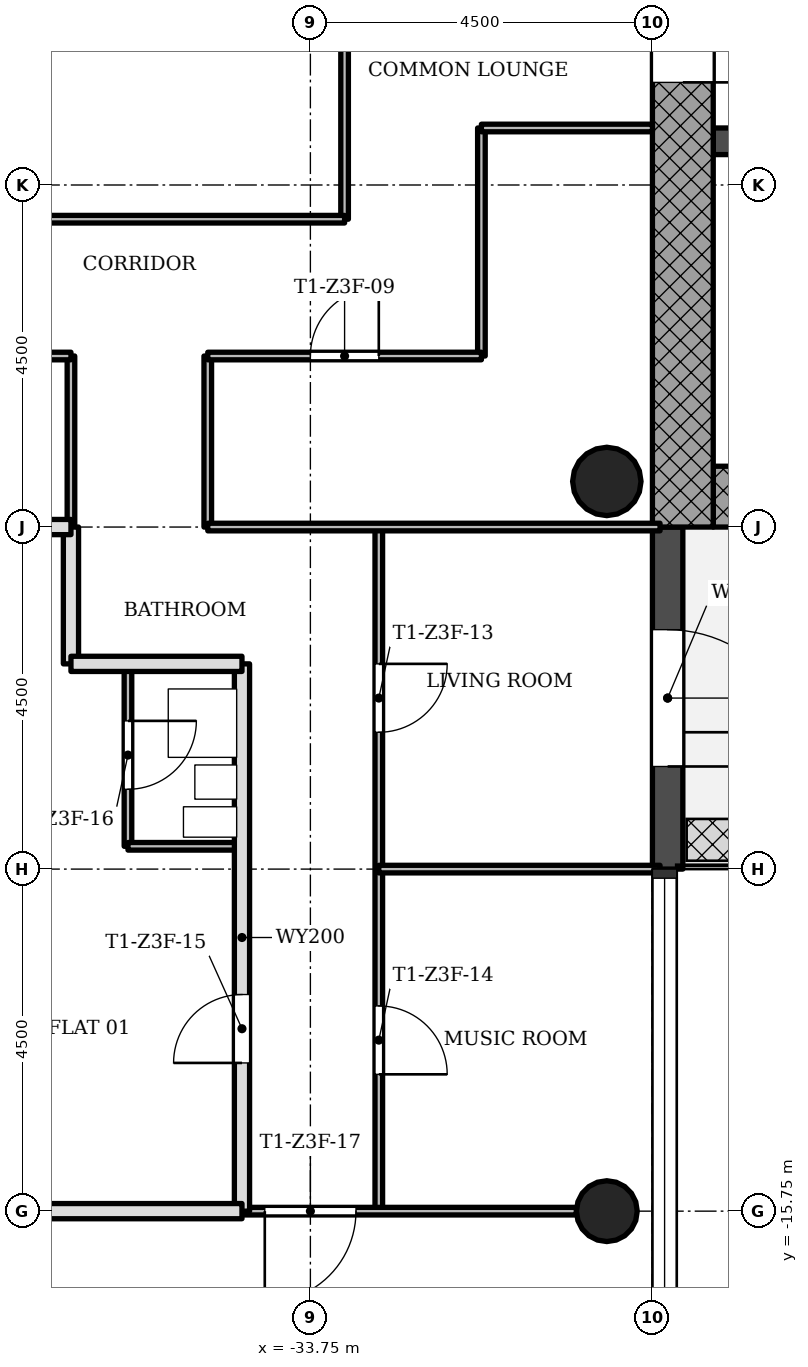
"""IFC4 building model, lengths in metres.
Left out: names, types, materials, properties, quantities, classifications, styles, units other than length and angle.
Written with IfcOpenShell. Run it as: python <this file> out.ifc"""

import sys

from ifc_helpers import new_model, si_unit, direction, frame, frame_2d, origin, origin_2d, place, context, subcontext, project, spatial, rectangle, hollow_circle, extrude, element, fill, save


model = new_model("IFC4")
c1 = context("Model", 3, precision=1e-05, world=origin(), true_north=direction((0.0, 1.0)))
c2 = subcontext(c1, "Body", "Model", "MODEL_VIEW")
j1 = project(units=[si_unit("LENGTHUNIT", "METRE"), si_unit("PLANEANGLEUNIT", "RADIAN")], contexts=[c1])
p1 = place(None, origin())
s1 = spatial("IfcSite", under=j1, at=p1, CompositionType="ELEMENT")
p2 = place(p1, origin())
s2 = spatial("IfcBuilding", under=s1, at=p2, CompositionType="ELEMENT")
p3 = place(p2, frame((0.0, 0.0, 167.7)))
s3 = spatial("IfcBuildingStorey", under=s2, at=p3, CompositionType="ELEMENT", Elevation=167.7)
p4 = place(p3, frame((-28.45, -6.35, 0.0), z_axis=(0.0, 0.0, 1.0), x_axis=(1.0, 0.0, 0.0)))
e1 = element("IfcWall", 1, at=p4, inside=s3, PredefinedType="SHEAR", context=c2, shape_type="SweptSolid", body=[
    extrude(rectangle(XDim=8.2, YDim=0.8, at=frame_2d((4.1, 0.0))), origin(), (0.0, 0.0, 1.0), 3.4),
])
p5 = place(p3, frame((-28.85, 5.95, 0.0), z_axis=(0.0, 0.0, 1.0), x_axis=(0.0, -1.0, 0.0)))
e2 = element("IfcWall", 2, at=p5, inside=s3, PredefinedType="SHEAR", context=c2, shape_type="SweptSolid", body=[
    extrude(rectangle(XDim=12.7, YDim=0.8, at=frame_2d((6.35, 0.0))), origin(), (0.0, 0.0, 1.0), 3.4),
])
p6 = place(p5, frame((5.05, 0.0, 0.0)))
e3 = element("IfcOpeningElement", 3, at=p6, cuts=e2, PredefinedType="OPENING", context=c2, shape_type="SweptSolid", body=[
    extrude(rectangle(XDim=1.8, YDim=2.1, at=frame_2d((0.9, 1.05))), frame((0.0, 0.41, 0.0), z_axis=(0.0, -1.0, 0.0), x_axis=(1.0, 0.0, 0.0)), (0.0, 0.0, 1.0), 0.82),
])
p7 = place(p3, frame((-28.45, -1.675, 0.0), z_axis=(0.0, 0.0, 1.0), x_axis=(1.0, 0.0, 0.0)))
e4 = element("IfcWall", 4, at=p7, inside=s3, PredefinedType="SHEAR", context=c2, shape_type="SweptSolid", body=[
    extrude(rectangle(XDim=7.4, YDim=0.35, at=frame_2d((3.7, 0.0))), origin(), (0.0, 0.0, 1.0), 3.4),
])
p8 = place(p7, frame((0.95, 0.0, 0.0)))
e5 = element("IfcOpeningElement", 5, at=p8, cuts=e4, PredefinedType="OPENING", context=c2, shape_type="SweptSolid", body=[
    extrude(rectangle(XDim=1.1, YDim=2.1, at=frame_2d((0.55, 1.05))), frame((0.0, 0.185, 0.0), z_axis=(0.0, -1.0, 0.0), x_axis=(1.0, 0.0, 0.0)), (0.0, 0.0, 1.0), 0.37),
])
p9 = place(p7, frame((3.15, 0.0, 0.0)))
e6 = element("IfcOpeningElement", 6, at=p9, cuts=e4, PredefinedType="OPENING", context=c2, shape_type="SweptSolid", body=[
    extrude(rectangle(XDim=1.1, YDim=2.1, at=frame_2d((0.55, 1.05))), frame((0.0, 0.185, 0.0), z_axis=(0.0, -1.0, 0.0), x_axis=(1.0, 0.0, 0.0)), (0.0, 0.0, 1.0), 0.37),
])
p10 = place(p7, frame((5.35, 0.0, 0.0)))
e7 = element("IfcOpeningElement", 7, at=p10, cuts=e4, PredefinedType="OPENING", context=c2, shape_type="SweptSolid", body=[
    extrude(rectangle(XDim=1.1, YDim=2.1, at=frame_2d((0.55, 1.05))), frame((0.0, 0.185, 0.0), z_axis=(0.0, -1.0, 0.0), x_axis=(1.0, 0.0, 0.0)), (0.0, 0.0, 1.0), 0.37),
])
p11 = place(p3, frame((-29.85, -15.75, 0.0), z_axis=(0.0, 0.0, 1.0), x_axis=(1.0, 0.0, 0.0)))
e8 = element("IfcColumn", 8, at=p11, inside=s3, PredefinedType="COLUMN", context=c2, shape_type="SweptSolid", body=[
    extrude(hollow_circle(Radius=0.4, WallThickness=0.028, at=origin_2d()), origin(), (0.0, 0.0, 1.0), 3.4),
])
p12 = place(p3, frame((-29.85, -6.15, 0.0), z_axis=(0.0, 0.0, 1.0), x_axis=(1.0, 0.0, 0.0)))
e9 = element("IfcColumn", 9, at=p12, inside=s3, PredefinedType="COLUMN", context=c2, shape_type="SweptSolid", body=[
    extrude(hollow_circle(Radius=0.45, WallThickness=0.032, at=origin_2d()), origin(), (0.0, 0.0, 1.0), 3.4),
])
p13 = place(p3, frame((-29.05, -11.25, -0.02), z_axis=(0.0, 0.0, 1.0), x_axis=(0.0, 1.0, 0.0)))
e10 = element("IfcWall", 10, at=p13, inside=s3, PredefinedType="STANDARD", context=c2, shape_type="SweptSolid", body=[
    extrude(rectangle(XDim=4.5, YDim=0.4, at=frame_2d((2.25, 0.0))), origin(), (0.0, 0.0, 1.0), 3.12),
])
p14 = place(p13, frame((1.35, 0.0, 0.02)))
e11 = element("IfcOpeningElement", 11, at=p14, cuts=e10, PredefinedType="OPENING", context=c2, shape_type="SweptSolid", body=[
    extrude(rectangle(XDim=1.8, YDim=2.1, at=frame_2d((0.9, 1.05))), frame((0.0, 0.21, 0.0), z_axis=(0.0, -1.0, 0.0), x_axis=(1.0, 0.0, 0.0)), (0.0, 0.0, 1.0), 0.42),
])
p15 = place(p3, frame((-36.9, -6.75, 0.0), z_axis=(0.0, 0.0, 1.0), x_axis=(0.0, 1.0, 0.0)))
e12 = element("IfcWall", 12, at=p15, inside=s3, PredefinedType="PARTITIONING", context=c2, shape_type="SweptSolid", body=[
    extrude(rectangle(XDim=2.25, YDim=0.1, at=frame_2d((1.125, 0.0))), origin(), (0.0, 0.0, 1.0), 3.0),
])
p16 = place(p3, frame((-36.9, -8.55, 0.0), z_axis=(0.0, 0.0, 1.0), x_axis=(0.0, 1.0, 0.0)))
e13 = element("IfcWall", 13, at=p16, inside=s3, PredefinedType="SOLIDWALL", context=c2, shape_type="SweptSolid", body=[
    extrude(rectangle(XDim=1.8, YDim=0.2, at=frame_2d((0.9, 0.0))), origin(), (0.0, 0.0, 1.0), 3.0),
])
p17 = place(p3, frame((-36.15, -10.95, 0.0), z_axis=(0.0, 0.0, 1.0), x_axis=(0.0, 1.0, 0.0)))
e14 = element("IfcWall", 14, at=p17, inside=s3, PredefinedType="PARTITIONING", context=c2, shape_type="SweptSolid", body=[
    extrude(rectangle(XDim=2.4, YDim=0.1, at=frame_2d((1.2, 0.0))), origin(), (0.0, 0.0, 1.0), 3.0),
])
p18 = place(p17, frame((0.75, 0.0, 0.0)))
e15 = element("IfcOpeningElement", 15, at=p18, cuts=e14, PredefinedType="OPENING", context=c2, shape_type="SweptSolid", body=[
    extrude(rectangle(XDim=0.9, YDim=2.1, at=frame_2d((0.45, 1.05))), frame((0.0, 0.06, 0.0), z_axis=(0.0, -1.0, 0.0), x_axis=(1.0, 0.0, 0.0)), (0.0, 0.0, 1.0), 0.12),
])
p19 = place(p3, frame((-35.1, -6.75, 0.0), z_axis=(0.0, 0.0, 1.0), x_axis=(0.0, 1.0, 0.0)))
e16 = element("IfcWall", 16, at=p19, inside=s3, PredefinedType="PARTITIONING", context=c2, shape_type="SweptSolid", body=[
    extrude(rectangle(XDim=2.25, YDim=0.1, at=frame_2d((1.125, 0.0))), origin(), (0.0, 0.0, 1.0), 3.0),
])
p20 = place(p3, frame((-34.65, -15.75, 0.0), z_axis=(0.0, 0.0, 1.0), x_axis=(0.0, 1.0, 0.0)))
e17 = element("IfcWall", 17, at=p20, inside=s3, PredefinedType="SOLIDWALL", context=c2, shape_type="SweptSolid", body=[
    extrude(rectangle(XDim=7.2, YDim=0.2, at=frame_2d((3.6, 0.0))), origin(), (0.0, 0.0, 1.0), 3.0),
])
p21 = place(p20, frame((1.95, 0.0, 0.0)))
e18 = element("IfcOpeningElement", 18, at=p21, cuts=e17, PredefinedType="OPENING", context=c2, shape_type="SweptSolid", body=[
    extrude(rectangle(XDim=0.9, YDim=2.1, at=frame_2d((0.45, 1.05))), frame((0.0, 0.11, 0.0), z_axis=(0.0, -1.0, 0.0), x_axis=(1.0, 0.0, 0.0)), (0.0, 0.0, 1.0), 0.22),
])
p22 = place(p3, frame((-33.3, -2.7, 0.0), z_axis=(0.0, 0.0, 1.0), x_axis=(0.0, 1.0, 0.0)))
e19 = element("IfcWall", 19, at=p22, inside=s3, PredefinedType="PARTITIONING", context=c2, shape_type="SweptSolid", body=[
    extrude(rectangle(XDim=5.4, YDim=0.1, at=frame_2d((2.7, 0.0))), origin(), (0.0, 0.0, 1.0), 3.0),
])
p23 = place(p22, frame((2.25, 0.0, 0.0)))
e20 = element("IfcOpeningElement", 20, at=p23, cuts=e19, PredefinedType="OPENING", context=c2, shape_type="SweptSolid", body=[
    extrude(rectangle(XDim=0.9, YDim=2.1, at=frame_2d((0.45, 1.05))), frame((0.0, 0.06, 0.0), z_axis=(0.0, -1.0, 0.0), x_axis=(1.0, 0.0, 0.0)), (0.0, 0.0, 1.0), 0.12),
])
p24 = place(p3, frame((-32.85, -15.75, 0.0), z_axis=(0.0, 0.0, 1.0), x_axis=(0.0, 1.0, 0.0)))
e21 = element("IfcWall", 21, at=p24, inside=s3, PredefinedType="PARTITIONING", context=c2, shape_type="SweptSolid", body=[
    extrude(rectangle(XDim=9.0, YDim=0.1, at=frame_2d((4.5, 0.0))), origin(), (0.0, 0.0, 1.0), 3.0),
])
p25 = place(p24, frame((6.3, 0.0, 0.0)))
e22 = element("IfcOpeningElement", 22, at=p25, cuts=e21, PredefinedType="OPENING", context=c2, shape_type="SweptSolid", body=[
    extrude(rectangle(XDim=0.9, YDim=2.1, at=frame_2d((0.45, 1.05))), frame((0.0, 0.06, 0.0), z_axis=(0.0, -1.0, 0.0), x_axis=(1.0, 0.0, 0.0)), (0.0, 0.0, 1.0), 0.12),
])
p26 = place(p24, frame((1.8, 0.0, 0.0)))
e23 = element("IfcOpeningElement", 23, at=p26, cuts=e21, PredefinedType="OPENING", context=c2, shape_type="SweptSolid", body=[
    extrude(rectangle(XDim=0.9, YDim=2.1, at=frame_2d((0.45, 1.05))), frame((0.0, 0.06, 0.0), z_axis=(0.0, -1.0, 0.0), x_axis=(1.0, 0.0, 0.0)), (0.0, 0.0, 1.0), 0.12),
])
p27 = place(p3, frame((-31.5, -4.5, 0.0), z_axis=(0.0, 0.0, 1.0), x_axis=(0.0, 1.0, 0.0)))
e24 = element("IfcWall", 24, at=p27, inside=s3, PredefinedType="PARTITIONING", context=c2, shape_type="SweptSolid", body=[
    extrude(rectangle(XDim=3.0, YDim=0.1, at=frame_2d((1.5, 0.0))), origin(), (0.0, 0.0, 1.0), 3.0),
])
p28 = place(p3, frame((-34.65, -15.75, 0.0), z_axis=(0.0, 0.0, 1.0), x_axis=(1.0, 0.0, 0.0)))
e25 = element("IfcWall", 25, at=p28, inside=s3, PredefinedType="PARTITIONING", context=c2, shape_type="SweptSolid", body=[
    extrude(rectangle(XDim=4.4, YDim=0.1, at=frame_2d((2.2, 0.0))), origin(), (0.0, 0.0, 1.0), 3.0),
])
p29 = place(p28, frame((0.3, 0.0, 0.0)))
e26 = element("IfcOpeningElement", 26, at=p29, cuts=e25, PredefinedType="OPENING", context=c2, shape_type="SweptSolid", body=[
    extrude(rectangle(XDim=1.2, YDim=2.1, at=frame_2d((0.6, 1.05))), frame((0.0, 0.06, 0.0), z_axis=(0.0, -1.0, 0.0), x_axis=(1.0, 0.0, 0.0)), (0.0, 0.0, 1.0), 0.12),
])
p30 = place(p3, frame((-41.75, -15.75, 0.0), z_axis=(0.0, 0.0, 1.0), x_axis=(1.0, 0.0, 0.0)))
e27 = element("IfcWall", 27, at=p30, inside=s3, PredefinedType="SOLIDWALL", context=c2, shape_type="SweptSolid", body=[
    extrude(rectangle(XDim=7.1, YDim=0.2, at=frame_2d((3.55, 0.0))), origin(), (0.0, 0.0, 1.0), 3.0),
])
p31 = place(p3, frame((-32.85, -11.25, 0.0), z_axis=(0.0, 0.0, 1.0), x_axis=(1.0, 0.0, 0.0)))
e28 = element("IfcWall", 28, at=p31, inside=s3, PredefinedType="PARTITIONING", context=c2, shape_type="SweptSolid", body=[
    extrude(rectangle(XDim=3.7, YDim=0.1, at=frame_2d((1.85, 0.0))), origin(), (0.0, 0.0, 1.0), 3.0),
])
p32 = place(p3, frame((-36.15, -10.95, 0.0), z_axis=(0.0, 0.0, 1.0), x_axis=(1.0, 0.0, 0.0)))
e29 = element("IfcWall", 29, at=p32, inside=s3, PredefinedType="PARTITIONING", context=c2, shape_type="SweptSolid", body=[
    extrude(rectangle(XDim=1.5, YDim=0.1, at=frame_2d((0.75, 0.0))), origin(), (0.0, 0.0, 1.0), 3.0),
])
p33 = place(p3, frame((-36.9, -8.55, 0.0), z_axis=(0.0, 0.0, 1.0), x_axis=(1.0, 0.0, 0.0)))
e30 = element("IfcWall", 30, at=p33, inside=s3, PredefinedType="SOLIDWALL", context=c2, shape_type="SweptSolid", body=[
    extrude(rectangle(XDim=2.25, YDim=0.2, at=frame_2d((1.125, 0.0))), origin(), (0.0, 0.0, 1.0), 3.0),
])
p34 = place(p3, frame((-35.1, -6.75, 0.0), z_axis=(0.0, 0.0, 1.0), x_axis=(1.0, 0.0, 0.0)))
e31 = element("IfcWall", 31, at=p34, inside=s3, PredefinedType="PARTITIONING", context=c2, shape_type="SweptSolid", body=[
    extrude(rectangle(XDim=5.95, YDim=0.1, at=frame_2d((2.975, 0.0))), origin(), (0.0, 0.0, 1.0), 3.0),
])
p35 = place(p3, frame((-42.85, -6.75, 0.0), z_axis=(0.0, 0.0, 1.0), x_axis=(1.0, 0.0, 0.0)))
e32 = element("IfcWall", 32, at=p35, inside=s3, PredefinedType="SOLIDWALL", context=c2, shape_type="SweptSolid", body=[
    extrude(rectangle(XDim=5.95, YDim=0.2, at=frame_2d((2.975, 0.0))), origin(), (0.0, 0.0, 1.0), 3.0),
])
p36 = place(p3, frame((-42.75, -4.5, 0.0), z_axis=(0.0, 0.0, 1.0), x_axis=(1.0, 0.0, 0.0)))
e33 = element("IfcWall", 33, at=p36, inside=s3, PredefinedType="PARTITIONING", context=c2, shape_type="SweptSolid", body=[
    extrude(rectangle(XDim=5.85, YDim=0.1, at=frame_2d((2.925, 0.0))), origin(), (0.0, 0.0, 1.0), 3.0),
])
p37 = place(p36, frame((3.6, 0.0, 0.0)))
e34 = element("IfcOpeningElement", 34, at=p37, cuts=e33, PredefinedType="OPENING", context=c2, shape_type="SweptSolid", body=[
    extrude(rectangle(XDim=0.9, YDim=2.1, at=frame_2d((0.45, 1.05))), frame((0.0, 0.06, 0.0), z_axis=(0.0, -1.0, 0.0), x_axis=(1.0, 0.0, 0.0)), (0.0, 0.0, 1.0), 0.12),
])
p38 = place(p3, frame((-35.1, -4.5, 0.0), z_axis=(0.0, 0.0, 1.0), x_axis=(1.0, 0.0, 0.0)))
e35 = element("IfcWall", 35, at=p38, inside=s3, PredefinedType="PARTITIONING", context=c2, shape_type="SweptSolid", body=[
    extrude(rectangle(XDim=3.6, YDim=0.1, at=frame_2d((1.8, 0.0))), origin(), (0.0, 0.0, 1.0), 3.0),
])
p39 = place(p38, frame((1.35, 0.0, 0.0)))
e36 = element("IfcOpeningElement", 36, at=p39, cuts=e35, PredefinedType="OPENING", context=c2, shape_type="SweptSolid", body=[
    extrude(rectangle(XDim=0.9, YDim=2.1, at=frame_2d((0.45, 1.05))), frame((0.0, 0.06, 0.0), z_axis=(0.0, -1.0, 0.0), x_axis=(1.0, 0.0, 0.0)), (0.0, 0.0, 1.0), 0.12),
])
p40 = place(p3, frame((-38.7, -2.7, 0.0), z_axis=(0.0, 0.0, 1.0), x_axis=(1.0, 0.0, 0.0)))
e37 = element("IfcWall", 37, at=p40, inside=s3, PredefinedType="PARTITIONING", context=c2, shape_type="SweptSolid", body=[
    extrude(rectangle(XDim=5.4, YDim=0.1, at=frame_2d((2.7, 0.0))), origin(), (0.0, 0.0, 1.0), 3.0),
])
p41 = place(p3, frame((-31.5, -1.5, 0.0), z_axis=(0.0, 0.0, 1.0), x_axis=(1.0, 0.0, 0.0)))
e38 = element("IfcWall", 38, at=p41, inside=s3, PredefinedType="PARTITIONING", context=c2, shape_type="SweptSolid", body=[
    extrude(rectangle(XDim=2.25, YDim=0.1, at=frame_2d((1.125, 0.0))), origin(), (0.0, 0.0, 1.0), 3.0),
])
p42 = place(p14, origin())
e39 = element("IfcDoor", 39, at=p42, inside=s3, OperationType="SINGLE_SWING_LEFT", PredefinedType="DOOR", context=c2, shape_type="SweptSolid", body=[
    extrude(rectangle(XDim=1.8, YDim=2.1, at=frame_2d((0.9, 1.05))), frame((0.0, 0.025, 0.0), z_axis=(0.0, -1.0, 0.0), x_axis=(1.0, 0.0, 0.0)), (0.0, 0.0, 1.0), 0.05),
])
fill(e11, e39)
p43 = place(p39, origin())
e40 = element("IfcDoor", 40, at=p43, inside=s3, OperationType="SINGLE_SWING_LEFT", PredefinedType="DOOR", context=c2, shape_type="SweptSolid", body=[
    extrude(rectangle(XDim=0.9, YDim=2.1, at=frame_2d((0.45, 1.05))), frame((0.0, 0.025, 0.0), z_axis=(0.0, -1.0, 0.0), x_axis=(1.0, 0.0, 0.0)), (0.0, 0.0, 1.0), 0.05),
])
fill(e36, e40)
p44 = place(p25, origin())
e41 = element("IfcDoor", 41, at=p44, inside=s3, OperationType="SINGLE_SWING_RIGHT", PredefinedType="DOOR", context=c2, shape_type="SweptSolid", body=[
    extrude(rectangle(XDim=0.9, YDim=2.1, at=frame_2d((0.45, 1.05))), frame((0.0, 0.025, 0.0), z_axis=(0.0, -1.0, 0.0), x_axis=(1.0, 0.0, 0.0)), (0.0, 0.0, 1.0), 0.05),
])
fill(e22, e41)
p45 = place(p26, origin())
e42 = element("IfcDoor", 42, at=p45, inside=s3, OperationType="SINGLE_SWING_LEFT", PredefinedType="DOOR", context=c2, shape_type="SweptSolid", body=[
    extrude(rectangle(XDim=0.9, YDim=2.1, at=frame_2d((0.45, 1.05))), frame((0.0, 0.025, 0.0), z_axis=(0.0, -1.0, 0.0), x_axis=(1.0, 0.0, 0.0)), (0.0, 0.0, 1.0), 0.05),
])
fill(e23, e42)
p46 = place(p21, origin())
e43 = element("IfcDoor", 43, at=p46, inside=s3, OperationType="SINGLE_SWING_RIGHT", PredefinedType="DOOR", context=c2, shape_type="SweptSolid", body=[
    extrude(rectangle(XDim=0.9, YDim=2.1, at=frame_2d((0.45, 1.05))), frame((0.0, 0.025, 0.0), z_axis=(0.0, -1.0, 0.0), x_axis=(1.0, 0.0, 0.0)), (0.0, 0.0, 1.0), 0.05),
])
fill(e18, e43)
p47 = place(p18, origin())
e44 = element("IfcDoor", 44, at=p47, inside=s3, OperationType="SINGLE_SWING_RIGHT", PredefinedType="DOOR", context=c2, shape_type="SweptSolid", body=[
    extrude(rectangle(XDim=0.9, YDim=2.1, at=frame_2d((0.45, 1.05))), frame((0.0, 0.025, 0.0), z_axis=(0.0, -1.0, 0.0), x_axis=(1.0, 0.0, 0.0)), (0.0, 0.0, 1.0), 0.05),
])
fill(e15, e44)
p48 = place(p29, origin())
e45 = element("IfcDoor", 45, at=p48, inside=s3, OperationType="SINGLE_SWING_LEFT", PredefinedType="DOOR", context=c2, shape_type="SweptSolid", body=[
    extrude(rectangle(XDim=1.2, YDim=2.1, at=frame_2d((0.6, 1.05))), frame((0.0, 0.025, 0.0), z_axis=(0.0, -1.0, 0.0), x_axis=(1.0, 0.0, 0.0)), (0.0, 0.0, 1.0), 0.05),
])
fill(e26, e45)
p49 = place(p6, origin())
e46 = element("IfcDoor", 46, at=p49, inside=s3, OperationType="SINGLE_SWING_LEFT", PredefinedType="DOOR", context=c2, shape_type="SweptSolid", body=[
    extrude(rectangle(XDim=1.8, YDim=2.1, at=frame_2d((0.9, 1.05))), frame((0.0, 0.025, 0.0), z_axis=(0.0, -1.0, 0.0), x_axis=(1.0, 0.0, 0.0)), (0.0, 0.0, 1.0), 0.05),
])
fill(e3, e46)
save(model, sys.argv[1])
